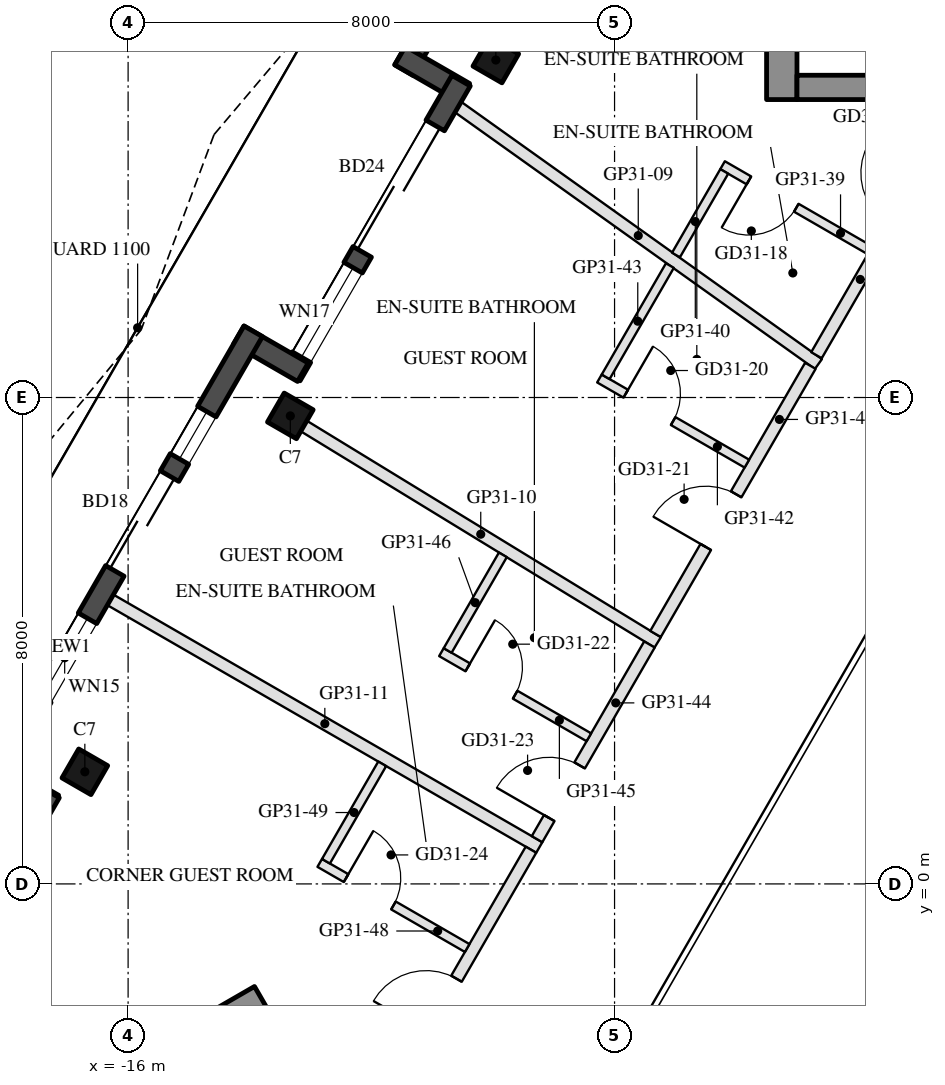
"""IFC4 building model, lengths in metres.
Left out: names, types, materials, properties, quantities, classifications, styles, units other than length and angle.
Written with IfcOpenShell. Run it as: python <this file> out.ifc"""

import sys

from ifc_helpers import new_model, si_unit, direction, frame, frame_2d, origin, origin_2d, place, context, subcontext, project, spatial, rectangle, hollow_rectangle, extrude, boolean, halfspace, element, fill, save


model = new_model("IFC4")
c1 = context("Model", 3, precision=1e-05, world=origin(), true_north=direction((0.0, 1.0)))
c2 = subcontext(c1, "Body", "Model", "MODEL_VIEW")
j1 = project(units=[si_unit("LENGTHUNIT", "METRE"), si_unit("PLANEANGLEUNIT", "RADIAN")], contexts=[c1])
p1 = place(None, origin())
s1 = spatial("IfcSite", under=j1, at=p1, CompositionType="ELEMENT")
p2 = place(p1, origin())
s2 = spatial("IfcBuilding", under=s1, at=p2, CompositionType="ELEMENT")
p3 = place(p2, frame((0.0, 0.0, 305.9)))
s3 = spatial("IfcBuildingStorey", under=s2, at=p3, CompositionType="ELEMENT", Elevation=305.9)
p4 = place(p3, frame((-9.953, 13.551, 0.0), z_axis=(0.0, 0.0, 1.0), x_axis=(0.5, 0.866025403784, 0.0)))
e1 = element("IfcColumn", 1, at=p4, inside=s3, PredefinedType="COLUMN", context=c2, shape_type="SweptSolid", body=[
    boolean("DIFFERENCE", extrude(hollow_rectangle(XDim=0.55, YDim=0.55, WallThickness=0.025, at=origin_2d()), origin(), (0.0, 0.0, 1.0), 3.7), halfspace(frame((0.0, 0.0, 3.666), z_axis=(0.0, 0.0, 1.0), x_axis=(1.0, 0.0, 0.0)), False)),
])
p5 = place(p3, frame((-13.332, 7.697, 0.0), z_axis=(0.0, 0.0, 1.0), x_axis=(0.5, 0.866025403784, 0.0)))
e2 = element("IfcColumn", 2, at=p5, inside=s3, PredefinedType="COLUMN", context=c2, shape_type="SweptSolid", body=[
    boolean("DIFFERENCE", extrude(hollow_rectangle(XDim=0.55, YDim=0.55, WallThickness=0.025, at=origin_2d()), origin(), (0.0, 0.0, 1.0), 3.7), halfspace(frame((0.0, 0.0, 3.669), z_axis=(0.0, 0.0, 1.0), x_axis=(1.0, 0.0, 0.0)), False)),
])
p6 = place(p3, frame((-16.711, 1.844, 0.0), z_axis=(0.0, 0.0, 1.0), x_axis=(0.5, 0.866025403784, 0.0)))
e3 = element("IfcColumn", 3, at=p6, inside=s3, PredefinedType="COLUMN", context=c2, shape_type="SweptSolid", body=[
    boolean("DIFFERENCE", extrude(hollow_rectangle(XDim=0.55, YDim=0.55, WallThickness=0.025, at=origin_2d()), origin(), (0.0, 0.0, 1.0), 3.7), halfspace(frame((0.0, 0.0, 3.666), z_axis=(0.0, 0.0, 1.0), x_axis=(1.0, 0.0, 0.0)), False)),
])
p7 = place(p3, frame((-6.344, 22.251, 0.0), z_axis=(0.0, 0.0, 1.0), x_axis=(-0.499983205548, -0.866035099848, 0.0)))
e4 = element("IfcWall", 4, at=p7, inside=s3, PredefinedType="SOLIDWALL", context=c2, shape_type="SweptSolid", body=[
    extrude(rectangle(XDim=10.239, YDim=0.35, at=frame_2d((5.12, 0.0))), origin(), (0.0, 0.0, 1.0), 3.55),
])
p8 = place(p7, frame((0.381, 0.0, 0.3)))
e5 = element("IfcOpeningElement", 5, at=p8, cuts=e4, PredefinedType="OPENING", context=c2, shape_type="SweptSolid", body=[
    extrude(rectangle(XDim=1.5, YDim=2.65, at=frame_2d((0.75, 1.325))), frame((0.0, 0.185, 0.0), z_axis=(0.0, -1.0, 0.0), x_axis=(1.0, 0.0, 0.0)), (0.0, 0.0, 1.0), 0.37),
])
p9 = place(p7, frame((6.314, 0.0, 0.0)))
e6 = element("IfcOpeningElement", 6, at=p9, cuts=e4, PredefinedType="OPENING", context=c2, shape_type="SweptSolid", body=[
    extrude(rectangle(XDim=2.4, YDim=2.4, at=frame_2d((1.2, 1.2))), frame((0.0, 0.185, 0.0), z_axis=(0.0, -1.0, 0.0), x_axis=(1.0, 0.0, 0.0)), (0.0, 0.0, 1.0), 0.37),
])
p10 = place(p7, frame((3.205, 0.0, 0.3)))
e7 = element("IfcOpeningElement", 7, at=p10, cuts=e4, PredefinedType="OPENING", context=c2, shape_type="SweptSolid", body=[
    extrude(rectangle(XDim=2.8, YDim=2.65, at=frame_2d((1.4, 1.325))), frame((0.0, 0.185, 0.0), z_axis=(0.0, -1.0, 0.0), x_axis=(1.0, 0.0, 0.0)), (0.0, 0.0, 1.0), 0.37),
])
p11 = place(p3, frame((-11.528, 13.623, 0.0), z_axis=(0.0, 0.0, 1.0), x_axis=(0.866005645448, -0.500034220881, 0.0)))
e8 = element("IfcWall", 8, at=p11, inside=s3, PredefinedType="SOLIDWALL", context=c2, shape_type="SweptSolid", body=[
    extrude(rectangle(XDim=1.22, YDim=0.35, at=frame_2d((0.61, 0.0))), origin(), (0.0, 0.0, 1.0), 3.55),
])
p12 = place(p3, frame((-10.524, 13.211, 0.0), z_axis=(0.0, 0.0, 1.0), x_axis=(-0.500008054862, -0.866020753258, 0.0)))
e9 = element("IfcWall", 9, at=p12, inside=s3, PredefinedType="SOLIDWALL", context=c2, shape_type="SweptSolid", body=[
    extrude(rectangle(XDim=5.599, YDim=0.35, at=frame_2d((2.8, 0.0))), origin(), (0.0, 0.0, 1.0), 3.55),
])
p13 = place(p12, frame((0.851, 0.0, 0.0)))
e10 = element("IfcOpeningElement", 10, at=p13, cuts=e9, PredefinedType="OPENING", context=c2, shape_type="SweptSolid", body=[
    extrude(rectangle(XDim=2.4, YDim=2.4, at=frame_2d((1.2, 1.2))), frame((0.0, 0.185, 0.0), z_axis=(0.0, -1.0, 0.0), x_axis=(1.0, 0.0, 0.0)), (0.0, 0.0, 1.0), 0.37),
])
p14 = place(p12, frame((3.551, 0.0, 0.3)))
e11 = element("IfcOpeningElement", 11, at=p14, cuts=e9, PredefinedType="OPENING", context=c2, shape_type="SweptSolid", body=[
    extrude(rectangle(XDim=1.7, YDim=2.65, at=frame_2d((0.85, 1.325))), frame((0.0, 0.185, 0.0), z_axis=(0.0, -1.0, 0.0), x_axis=(1.0, 0.0, 0.0)), (0.0, 0.0, 1.0), 0.37),
])
p15 = place(p3, frame((-13.125, 8.415, 0.0), z_axis=(0.0, 0.0, 1.0), x_axis=(-0.865955602162, 0.500120880472, 0.0)))
e12 = element("IfcWall", 12, at=p15, inside=s3, PredefinedType="SOLIDWALL", context=c2, shape_type="SweptSolid", body=[
    extrude(rectangle(XDim=1.22, YDim=0.35, at=frame_2d((0.61, 0.0))), origin(), (0.0, 0.0, 1.0), 3.55),
])
p16 = place(p3, frame((-13.943, 9.089, 0.0), z_axis=(0.0, 0.0, 1.0), x_axis=(-0.500013816581, -0.866017426631, 0.0)))
e13 = element("IfcWall", 13, at=p16, inside=s3, PredefinedType="SOLIDWALL", context=c2, shape_type="SweptSolid", body=[
    extrude(rectangle(XDim=8.559, YDim=0.35, at=frame_2d((4.279, 0.0))), origin(), (0.0, 0.0, 1.0), 3.55),
])
p17 = place(p16, frame((2.75, 0.0, 0.0)))
e14 = element("IfcOpeningElement", 14, at=p17, cuts=e13, PredefinedType="OPENING", context=c2, shape_type="SweptSolid", body=[
    extrude(rectangle(XDim=1.8, YDim=2.4, at=frame_2d((0.9, 1.2))), frame((0.0, 0.185, 0.0), z_axis=(0.0, -1.0, 0.0), x_axis=(1.0, 0.0, 0.0)), (0.0, 0.0, 1.0), 0.37),
])
p18 = place(p16, frame((1.525, 0.0, 0.3)))
e15 = element("IfcOpeningElement", 15, at=p18, cuts=e13, PredefinedType="OPENING", context=c2, shape_type="SweptSolid", body=[
    extrude(rectangle(XDim=0.9, YDim=2.65, at=frame_2d((0.45, 1.325))), frame((0.0, 0.185, 0.0), z_axis=(0.0, -1.0, 0.0), x_axis=(1.0, 0.0, 0.0)), (0.0, 0.0, 1.0), 0.37),
])
p19 = place(p16, frame((5.45, 0.0, 0.3)))
e16 = element("IfcOpeningElement", 16, at=p19, cuts=e13, PredefinedType="OPENING", context=c2, shape_type="SweptSolid", body=[
    extrude(rectangle(XDim=1.5, YDim=2.65, at=frame_2d((0.75, 1.325))), frame((0.0, 0.185, 0.0), z_axis=(0.0, -1.0, 0.0), x_axis=(1.0, 0.0, 0.0)), (0.0, 0.0, 1.0), 0.37),
])
p20 = place(p3, frame((-18.287, 1.916, 0.0), z_axis=(0.0, 0.0, 1.0), x_axis=(0.866142280446, -0.499797509021, 0.0)))
e17 = element("IfcWall", 17, at=p20, inside=s3, PredefinedType="SOLIDWALL", context=c2, shape_type="SweptSolid", body=[
    extrude(rectangle(XDim=1.22, YDim=0.35, at=frame_2d((0.61, 0.0))), origin(), (0.0, 0.0, 1.0), 3.55),
])
p21 = place(p3, frame((-17.283, 1.504, 0.0), z_axis=(0.0, 0.0, 1.0), x_axis=(-0.500008054862, -0.866020753258, 0.0)))
e18 = element("IfcWall", 18, at=p21, inside=s3, PredefinedType="SOLIDWALL", context=c2, shape_type="SweptSolid", body=[
    extrude(rectangle(XDim=5.599, YDim=0.35, at=frame_2d((2.8, 0.0))), origin(), (0.0, 0.0, 1.0), 3.55),
])
p22 = place(p21, frame((0.77, 0.0, 0.0)))
e19 = element("IfcOpeningElement", 19, at=p22, cuts=e18, PredefinedType="OPENING", context=c2, shape_type="SweptSolid", body=[
    extrude(rectangle(XDim=2.4, YDim=2.4, at=frame_2d((1.2, 1.2))), frame((0.0, 0.185, 0.0), z_axis=(0.0, -1.0, 0.0), x_axis=(1.0, 0.0, 0.0)), (0.0, 0.0, 1.0), 0.37),
])
p23 = place(p21, frame((3.47, 0.0, 0.3)))
e20 = element("IfcOpeningElement", 20, at=p23, cuts=e18, PredefinedType="OPENING", context=c2, shape_type="SweptSolid", body=[
    extrude(rectangle(XDim=1.8, YDim=2.65, at=frame_2d((0.9, 1.325))), frame((0.0, 0.185, 0.0), z_axis=(0.0, -1.0, 0.0), x_axis=(1.0, 0.0, 0.0)), (0.0, 0.0, 1.0), 0.37),
])
p24 = place(p3, frame((-5.25, 12.9, 0.0), z_axis=(0.0, 0.0, 1.0), x_axis=(0.0, 1.0, 0.0)))
e21 = element("IfcWall", 21, at=p24, inside=s3, PredefinedType="SHEAR", context=c2, shape_type="SweptSolid", body=[
    extrude(rectangle(XDim=10.299, YDim=0.5, at=frame_2d((5.149, 0.0))), origin(), (0.0, 0.0, 1.0), 3.5),
])
p25 = place(p3, frame((5.0, 13.1, 0.0), z_axis=(0.0, 0.0, 1.0), x_axis=(-1.0, 0.0, 0.0)))
e22 = element("IfcWall", 22, at=p25, inside=s3, PredefinedType="SHEAR", context=c2, shape_type="SweptSolid", body=[
    extrude(rectangle(XDim=10.0, YDim=0.4, at=frame_2d((5.0, 0.0))), origin(), (0.0, 0.0, 1.0), 3.5),
])
p26 = place(p25, frame((3.55, 0.0, 0.0)))
e23 = element("IfcOpeningElement", 23, at=p26, cuts=e22, PredefinedType="OPENING", context=c2, shape_type="SweptSolid", body=[
    extrude(rectangle(XDim=1.1, YDim=2.1, at=frame_2d((0.55, 1.05))), frame((0.0, 0.21, 0.0), z_axis=(0.0, -1.0, 0.0), x_axis=(1.0, 0.0, 0.0)), (0.0, 0.0, 1.0), 0.42),
])
p27 = place(p25, frame((5.85, 0.0, 0.0)))
e24 = element("IfcOpeningElement", 24, at=p27, cuts=e22, PredefinedType="OPENING", context=c2, shape_type="SweptSolid", body=[
    extrude(rectangle(XDim=1.4, YDim=2.1, at=frame_2d((0.7, 1.05))), frame((0.0, 0.21, 0.0), z_axis=(0.0, -1.0, 0.0), x_axis=(1.0, 0.0, 0.0)), (0.0, 0.0, 1.0), 0.42),
])
p28 = place(p3, frame((-13.797, -1.903, 0.0), z_axis=(0.0, 0.0, 1.0), x_axis=(-0.866027279078, -0.499996751883, 0.0)))
e25 = element("IfcWall", 25, at=p28, inside=s3, PredefinedType="SHEAR", context=c2, shape_type="SweptSolid", body=[
    extrude(rectangle(XDim=10.298, YDim=0.5, at=frame_2d((5.149, 0.0))), origin(), (0.0, 0.0, 1.0), 3.5),
])
p29 = place(p3, frame((-10.573, 12.776, 0.0), z_axis=(0.0, 0.0, 1.0), x_axis=(0.814114082564, -0.580704968613, 0.0)))
e26 = element("IfcWall", 26, at=p29, inside=s3, PredefinedType="PARTITIONING", context=c2, shape_type="SweptSolid", body=[
    extrude(rectangle(XDim=7.278, YDim=0.2, at=frame_2d((3.639, 0.0))), origin(), (0.0, 0.0, 1.0), 3.1),
])
p30 = place(p3, frame((-13.111, 7.531, 0.0), z_axis=(0.0, 0.0, 1.0), x_axis=(0.853158842711, -0.521651214034, 0.0)))
e27 = element("IfcWall", 27, at=p30, inside=s3, PredefinedType="PARTITIONING", context=c2, shape_type="SweptSolid", body=[
    extrude(rectangle(XDim=6.822, YDim=0.2, at=frame_2d((3.411, 0.0))), origin(), (0.0, 0.0, 1.0), 3.1),
])
p31 = place(p3, frame((-16.292, 4.672, 0.0), z_axis=(0.0, 0.0, 1.0), x_axis=(0.866028345359, -0.499994905008, 0.0)))
e28 = element("IfcWall", 28, at=p31, inside=s3, PredefinedType="PARTITIONING", context=c2, shape_type="SweptSolid", body=[
    extrude(rectangle(XDim=8.145, YDim=0.2, at=frame_2d((4.072, 0.0))), origin(), (0.0, 0.0, 1.0), 3.1),
])
p32 = place(p3, frame((-4.679, 8.695, 0.0), z_axis=(0.0, 0.0, 1.0), x_axis=(0.499986760557, 0.866033047446, 0.0)))
e29 = element("IfcWall", 29, at=p32, inside=s3, PredefinedType="PARTITIONING", context=c2, shape_type="SweptSolid", body=[
    extrude(rectangle(XDim=4.798, YDim=0.2, at=frame_2d((2.399, 0.0))), origin(), (0.0, 0.0, 1.0), 3.1),
])
p33 = place(p32, frame((2.46, 0.0, 0.0)))
e30 = element("IfcOpeningElement", 30, at=p33, cuts=e29, PredefinedType="OPENING", context=c2, shape_type="SweptSolid", body=[
    extrude(rectangle(XDim=1.0, YDim=2.1, at=frame_2d((0.5, 1.05))), frame((0.0, 0.11, 0.0), z_axis=(0.0, -1.0, 0.0), x_axis=(1.0, 0.0, 0.0)), (0.0, 0.0, 1.0), 0.22),
])
p34 = place(p3, frame((-3.799, 10.421, 0.0), z_axis=(0.0, 0.0, 1.0), x_axis=(-0.866034573852, 0.49998411664, 0.0)))
e31 = element("IfcWall", 31, at=p34, inside=s3, PredefinedType="PARTITIONING", context=c2, shape_type="SweptSolid", body=[
    extrude(rectangle(XDim=2.8, YDim=0.15, at=frame_2d((1.4, 0.0))), origin(), (0.0, 0.0, 1.0), 3.55),
])
p35 = place(p34, frame((1.4, 0.0, 0.0)))
e32 = element("IfcOpeningElement", 32, at=p35, cuts=e31, PredefinedType="OPENING", context=c2, shape_type="SweptSolid", body=[
    extrude(rectangle(XDim=0.9, YDim=2.1, at=frame_2d((0.45, 1.05))), frame((0.0, 0.085, 0.0), z_axis=(0.0, -1.0, 0.0), x_axis=(1.0, 0.0, 0.0)), (0.0, 0.0, 1.0), 0.17),
])
p36 = place(p3, frame((-6.196, 11.719, 0.0), z_axis=(0.0, 0.0, 1.0), x_axis=(-0.500041894521, -0.86600121462, 0.0)))
e33 = element("IfcWall", 33, at=p36, inside=s3, PredefinedType="PARTITIONING", context=c2, shape_type="SweptSolid", body=[
    extrude(rectangle(XDim=1.588, YDim=0.15, at=frame_2d((0.794, 0.0))), origin(), (0.0, 0.0, 1.0), 3.1),
])
p37 = place(p3, frame((-7.326, 4.111, 0.0), z_axis=(0.0, 0.0, 1.0), x_axis=(0.499970062876, 0.866042687301, 0.0)))
e34 = element("IfcWall", 34, at=p37, inside=s3, PredefinedType="PARTITIONING", context=c2, shape_type="SweptSolid", body=[
    extrude(rectangle(XDim=5.093, YDim=0.2, at=frame_2d((2.546, 0.0))), origin(), (0.0, 0.0, 1.0), 3.1),
])
p38 = place(p37, frame((1.652, 0.0, 0.0)))
e35 = element("IfcOpeningElement", 35, at=p38, cuts=e34, PredefinedType="OPENING", context=c2, shape_type="SweptSolid", body=[
    extrude(rectangle(XDim=1.0, YDim=2.1, at=frame_2d((0.5, 1.05))), frame((0.0, 0.11, 0.0), z_axis=(0.0, -1.0, 0.0), x_axis=(1.0, 0.0, 0.0)), (0.0, 0.0, 1.0), 0.22),
])
p39 = place(p3, frame((-8.249, 8.312, 0.0), z_axis=(0.0, 0.0, 1.0), x_axis=(0.866034573852, -0.49998411664, 0.0)))
e36 = element("IfcWall", 36, at=p39, inside=s3, PredefinedType="PARTITIONING", context=c2, shape_type="SweptSolid", body=[
    extrude(rectangle(XDim=2.8, YDim=0.15, at=frame_2d((1.4, 0.0))), origin(), (0.0, 0.0, 1.0), 3.55),
])
p40 = place(p39, frame((0.5, 0.0, 0.0)))
e37 = element("IfcOpeningElement", 37, at=p40, cuts=e36, PredefinedType="OPENING", context=c2, shape_type="SweptSolid", body=[
    extrude(rectangle(XDim=0.9, YDim=2.1, at=frame_2d((0.45, 1.05))), frame((0.0, 0.085, 0.0), z_axis=(0.0, -1.0, 0.0), x_axis=(1.0, 0.0, 0.0)), (0.0, 0.0, 1.0), 0.17),
])
p41 = place(p3, frame((-7.09, 10.169, 0.0), z_axis=(0.0, 0.0, 1.0), x_axis=(-0.500079259916, -0.865979638214, 0.0)))
e38 = element("IfcWall", 38, at=p41, inside=s3, PredefinedType="PARTITIONING", context=c2, shape_type="SweptSolid", body=[
    extrude(rectangle(XDim=2.113, YDim=0.15, at=frame_2d((1.056, 0.0))), origin(), (0.0, 0.0, 1.0), 3.1),
])
p42 = place(p3, frame((-9.275, 0.736, 0.0), z_axis=(0.0, 0.0, 1.0), x_axis=(0.50002346599, 0.866011855265, 0.0)))
e39 = element("IfcWall", 39, at=p42, inside=s3, PredefinedType="PARTITIONING", context=c2, shape_type="SweptSolid", body=[
    extrude(rectangle(XDim=3.698, YDim=0.2, at=frame_2d((1.849, 0.0))), origin(), (0.0, 0.0, 1.0), 3.1),
])
p43 = place(p42, frame((0.401, 0.0, 0.0)))
e40 = element("IfcOpeningElement", 40, at=p43, cuts=e39, PredefinedType="OPENING", context=c2, shape_type="SweptSolid", body=[
    extrude(rectangle(XDim=1.0, YDim=2.1, at=frame_2d((0.5, 1.05))), frame((0.0, 0.11, 0.0), z_axis=(0.0, -1.0, 0.0), x_axis=(1.0, 0.0, 0.0)), (0.0, 0.0, 1.0), 0.22),
])
p44 = place(p3, frame((-10.847, 3.812, 0.0), z_axis=(0.0, 0.0, 1.0), x_axis=(0.865996816683, -0.500049511043, 0.0)))
e41 = element("IfcWall", 41, at=p44, inside=s3, PredefinedType="PARTITIONING", context=c2, shape_type="SweptSolid", body=[
    extrude(rectangle(XDim=2.8, YDim=0.15, at=frame_2d((1.4, 0.0))), origin(), (0.0, 0.0, 1.0), 3.55),
])
p45 = place(p44, frame((0.5, 0.0, 0.0)))
e42 = element("IfcOpeningElement", 42, at=p45, cuts=e41, PredefinedType="OPENING", context=c2, shape_type="SweptSolid", body=[
    extrude(rectangle(XDim=0.9, YDim=2.1, at=frame_2d((0.45, 1.05))), frame((0.0, 0.085, 0.0), z_axis=(0.0, -1.0, 0.0), x_axis=(1.0, 0.0, 0.0)), (0.0, 0.0, 1.0), 0.17),
])
p46 = place(p3, frame((-9.837, 5.412, 0.0), z_axis=(0.0, 0.0, 1.0), x_axis=(-0.499970715924, -0.866042310294, 0.0)))
e43 = element("IfcWall", 43, at=p46, inside=s3, PredefinedType="PARTITIONING", context=c2, shape_type="SweptSolid", body=[
    extrude(rectangle(XDim=1.816, YDim=0.15, at=frame_2d((0.908, 0.0))), origin(), (0.0, 0.0, 1.0), 3.55),
])
p47 = place(p3, frame((-12.269, -4.45, 0.0), z_axis=(0.0, 0.0, 1.0), x_axis=(0.50002670742, 0.866009983699, 0.0)))
e44 = element("IfcWall", 44, at=p47, inside=s3, PredefinedType="PARTITIONING", context=c2, shape_type="SweptSolid", body=[
    extrude(rectangle(XDim=5.788, YDim=0.2, at=frame_2d((2.894, 0.0))), origin(), (0.0, 0.0, 1.0), 3.1),
])
p48 = place(p47, frame((2.338, 0.0, 0.0)))
e45 = element("IfcOpeningElement", 45, at=p48, cuts=e44, PredefinedType="OPENING", context=c2, shape_type="SweptSolid", body=[
    extrude(rectangle(XDim=1.0, YDim=2.1, at=frame_2d((0.5, 1.05))), frame((0.0, 0.11, 0.0), z_axis=(0.0, -1.0, 0.0), x_axis=(1.0, 0.0, 0.0)), (0.0, 0.0, 1.0), 0.22),
])
p49 = place(p3, frame((-12.849, 0.346, 0.0), z_axis=(0.0, 0.0, 1.0), x_axis=(0.866018616679, -0.500011755427, 0.0)))
e46 = element("IfcWall", 46, at=p49, inside=s3, PredefinedType="PARTITIONING", context=c2, shape_type="SweptSolid", body=[
    extrude(rectangle(XDim=2.8, YDim=0.15, at=frame_2d((1.4, 0.0))), origin(), (0.0, 0.0, 1.0), 3.55),
])
p50 = place(p49, frame((0.5, 0.0, 0.0)))
e47 = element("IfcOpeningElement", 47, at=p50, cuts=e46, PredefinedType="OPENING", context=c2, shape_type="SweptSolid", body=[
    extrude(rectangle(XDim=0.9, YDim=2.1, at=frame_2d((0.45, 1.05))), frame((0.0, 0.085, 0.0), z_axis=(0.0, -1.0, 0.0), x_axis=(1.0, 0.0, 0.0)), (0.0, 0.0, 1.0), 0.17),
])
p51 = place(p3, frame((-11.821, 1.975, 0.0), z_axis=(0.0, 0.0, 1.0), x_axis=(-0.500042316284, -0.866000971088, 0.0)))
e48 = element("IfcWall", 48, at=p51, inside=s3, PredefinedType="PARTITIONING", context=c2, shape_type="SweptSolid", body=[
    extrude(rectangle(XDim=1.85, YDim=0.15, at=frame_2d((0.925, 0.0))), origin(), (0.0, 0.0, 1.0), 3.55),
])
p52 = place(p13, frame((2.4, 0.0, 0.0), z_axis=(0.0, 0.0, 1.0), x_axis=(-1.0, 0.0, 0.0)))
e49 = element("IfcDoor", 49, at=p52, inside=s3, OperationType="SLIDING_TO_LEFT", PredefinedType="DOOR", context=c2, shape_type="SweptSolid", body=[
    extrude(rectangle(XDim=2.4, YDim=2.4, at=frame_2d((1.2, 1.2))), frame((0.0, 0.025, 0.0), z_axis=(0.0, -1.0, 0.0), x_axis=(1.0, 0.0, 0.0)), (0.0, 0.0, 1.0), 0.05),
])
fill(e10, e49)
p53 = place(p14, origin())
e50 = element("IfcWindow", 50, at=p53, inside=s3, PartitioningType="SINGLE_PANEL", PredefinedType="WINDOW", context=c2, shape_type="SweptSolid", body=[
    extrude(rectangle(XDim=1.7, YDim=2.65, at=frame_2d((0.85, 1.325))), frame((0.0, 0.03, 0.0), z_axis=(0.0, -1.0, 0.0), x_axis=(1.0, 0.0, 0.0)), (0.0, 0.0, 1.0), 0.06),
])
fill(e11, e50)
p54 = place(p17, frame((1.8, 0.0, 0.0), z_axis=(0.0, 0.0, 1.0), x_axis=(-1.0, 0.0, 0.0)))
e51 = element("IfcDoor", 51, at=p54, inside=s3, OperationType="SLIDING_TO_LEFT", PredefinedType="DOOR", context=c2, shape_type="SweptSolid", body=[
    extrude(rectangle(XDim=1.8, YDim=2.4, at=frame_2d((0.9, 1.2))), frame((0.0, 0.025, 0.0), z_axis=(0.0, -1.0, 0.0), x_axis=(1.0, 0.0, 0.0)), (0.0, 0.0, 1.0), 0.05),
])
fill(e14, e51)
p55 = place(p18, origin())
e52 = element("IfcWindow", 52, at=p55, inside=s3, PartitioningType="SINGLE_PANEL", PredefinedType="WINDOW", context=c2, shape_type="SweptSolid", body=[
    extrude(rectangle(XDim=0.9, YDim=2.65, at=frame_2d((0.45, 1.325))), frame((0.0, 0.03, 0.0), z_axis=(0.0, -1.0, 0.0), x_axis=(1.0, 0.0, 0.0)), (0.0, 0.0, 1.0), 0.06),
])
fill(e15, e52)
p56 = place(p19, origin())
e53 = element("IfcWindow", 53, at=p56, inside=s3, PartitioningType="SINGLE_PANEL", PredefinedType="WINDOW", context=c2, shape_type="SweptSolid", body=[
    extrude(rectangle(XDim=1.5, YDim=2.65, at=frame_2d((0.75, 1.325))), frame((0.0, 0.03, 0.0), z_axis=(0.0, -1.0, 0.0), x_axis=(1.0, 0.0, 0.0)), (0.0, 0.0, 1.0), 0.06),
])
fill(e16, e53)
p57 = place(p35, origin())
e54 = element("IfcDoor", 54, at=p57, inside=s3, OperationType="SINGLE_SWING_RIGHT", PredefinedType="DOOR", context=c2, shape_type="SweptSolid", body=[
    extrude(rectangle(XDim=0.9, YDim=2.1, at=frame_2d((0.45, 1.05))), frame((0.0, 0.025, 0.0), z_axis=(0.0, -1.0, 0.0), x_axis=(1.0, 0.0, 0.0)), (0.0, 0.0, 1.0), 0.05),
])
fill(e32, e54)
p58 = place(p40, origin())
e55 = element("IfcDoor", 55, at=p58, inside=s3, OperationType="SINGLE_SWING_LEFT", PredefinedType="DOOR", context=c2, shape_type="SweptSolid", body=[
    extrude(rectangle(XDim=0.9, YDim=2.1, at=frame_2d((0.45, 1.05))), frame((0.0, 0.025, 0.0), z_axis=(0.0, -1.0, 0.0), x_axis=(1.0, 0.0, 0.0)), (0.0, 0.0, 1.0), 0.05),
])
fill(e37, e55)
p59 = place(p38, origin())
e56 = element("IfcDoor", 56, at=p59, inside=s3, OperationType="SINGLE_SWING_LEFT", PredefinedType="DOOR", context=c2, shape_type="SweptSolid", body=[
    extrude(rectangle(XDim=1.0, YDim=2.1, at=frame_2d((0.5, 1.05))), frame((0.0, 0.025, 0.0), z_axis=(0.0, -1.0, 0.0), x_axis=(1.0, 0.0, 0.0)), (0.0, 0.0, 1.0), 0.05),
])
fill(e35, e56)
p60 = place(p45, origin())
e57 = element("IfcDoor", 57, at=p60, inside=s3, OperationType="SINGLE_SWING_LEFT", PredefinedType="DOOR", context=c2, shape_type="SweptSolid", body=[
    extrude(rectangle(XDim=0.9, YDim=2.1, at=frame_2d((0.45, 1.05))), frame((0.0, 0.025, 0.0), z_axis=(0.0, -1.0, 0.0), x_axis=(1.0, 0.0, 0.0)), (0.0, 0.0, 1.0), 0.05),
])
fill(e42, e57)
p61 = place(p43, origin())
e58 = element("IfcDoor", 58, at=p61, inside=s3, OperationType="SINGLE_SWING_LEFT", PredefinedType="DOOR", context=c2, shape_type="SweptSolid", body=[
    extrude(rectangle(XDim=1.0, YDim=2.1, at=frame_2d((0.5, 1.05))), frame((0.0, 0.025, 0.0), z_axis=(0.0, -1.0, 0.0), x_axis=(1.0, 0.0, 0.0)), (0.0, 0.0, 1.0), 0.05),
])
fill(e40, e58)
p62 = place(p50, origin())
e59 = element("IfcDoor", 59, at=p62, inside=s3, OperationType="SINGLE_SWING_LEFT", PredefinedType="DOOR", context=c2, shape_type="SweptSolid", body=[
    extrude(rectangle(XDim=0.9, YDim=2.1, at=frame_2d((0.45, 1.05))), frame((0.0, 0.025, 0.0), z_axis=(0.0, -1.0, 0.0), x_axis=(1.0, 0.0, 0.0)), (0.0, 0.0, 1.0), 0.05),
])
fill(e47, e59)
p63 = place(p48, origin())
e60 = element("IfcDoor", 60, at=p63, inside=s3, OperationType="SINGLE_SWING_LEFT", PredefinedType="DOOR", context=c2, shape_type="SweptSolid", body=[
    extrude(rectangle(XDim=1.0, YDim=2.1, at=frame_2d((0.5, 1.05))), frame((0.0, 0.025, 0.0), z_axis=(0.0, -1.0, 0.0), x_axis=(1.0, 0.0, 0.0)), (0.0, 0.0, 1.0), 0.05),
])
fill(e45, e60)
save(model, sys.argv[1])
